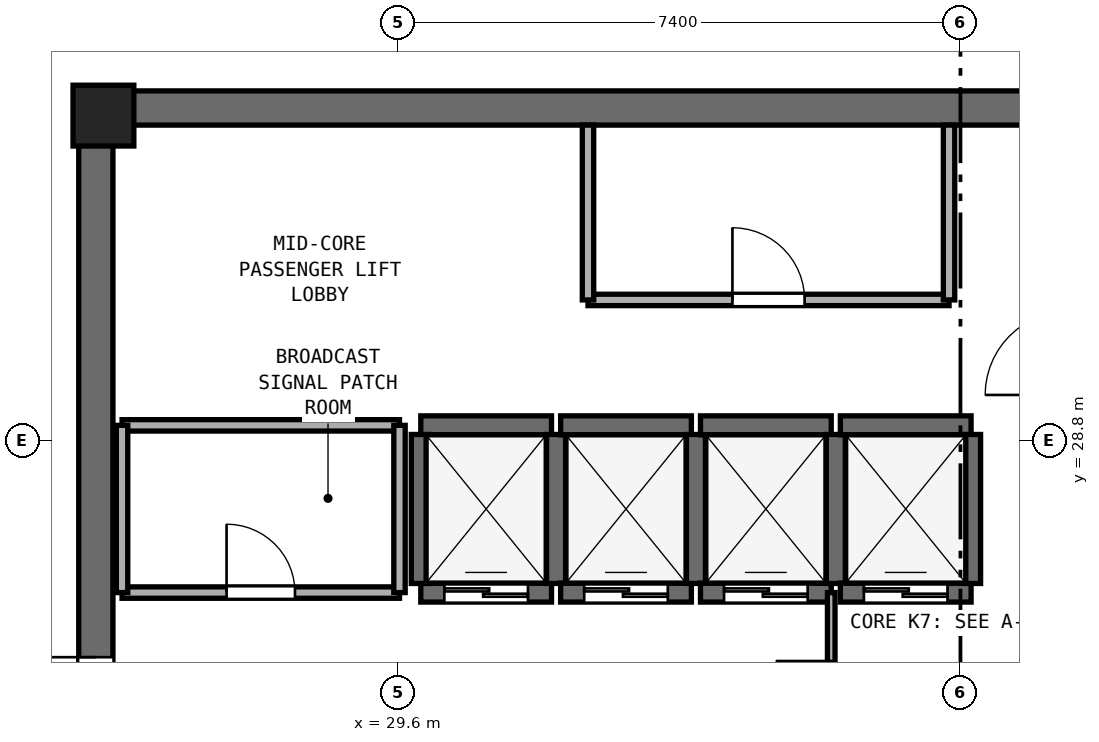
"""IFC4 building model, lengths in metres.
Left out: names, types, materials, properties, quantities, classifications, styles, units other than length and angle.
Written with IfcOpenShell. Run it as: python <this file> out.ifc"""

import sys

from ifc_helpers import new_model, si_unit, direction, frame, frame_2d, origin, origin_2d, place, context, subcontext, project, spatial, rectangle, extrude, element, fill, save


model = new_model("IFC4")
c1 = context("Model", 3, precision=1e-05, world=origin(), true_north=direction((0.0, 1.0)))
c2 = subcontext(c1, "Body", "Model", "MODEL_VIEW")
j1 = project(units=[si_unit("LENGTHUNIT", "METRE"), si_unit("PLANEANGLEUNIT", "RADIAN")], contexts=[c1])
p1 = place(None, origin())
s1 = spatial("IfcSite", under=j1, at=p1, CompositionType="ELEMENT")
p2 = place(p1, origin())
s2 = spatial("IfcBuilding", under=s1, at=p2, CompositionType="ELEMENT")
p3 = place(p2, frame((0.0, 0.0, 255.4)))
s3 = spatial("IfcBuildingStorey", under=s2, at=p3, CompositionType="ELEMENT", Elevation=255.4)
p4 = place(p3, frame((25.4, 33.175, 0.0), z_axis=(0.0, 0.0, 1.0), x_axis=(1.0, 0.0, 0.0)))
e1 = element("IfcWall", 1, at=p4, inside=s3, PredefinedType="SHEAR", context=c2, shape_type="SweptSolid", body=[
    extrude(rectangle(XDim=23.2, YDim=0.45, at=frame_2d((11.6, 0.0))), origin(), (0.0, 0.0, 1.0), 3.51),
])
p5 = place(p3, frame((25.625, 17.45, 0.0), z_axis=(0.0, 0.0, 1.0), x_axis=(0.0, 1.0, 0.0)))
e2 = element("IfcWall", 2, at=p5, inside=s3, PredefinedType="SHEAR", context=c2, shape_type="SweptSolid", body=[
    extrude(rectangle(XDim=15.5, YDim=0.45, at=frame_2d((7.75, 0.0))), origin(), (0.0, 0.0, 1.0), 3.51),
])
p6 = place(p5, frame((7.0, 0.0, 0.0)))
e3 = element("IfcOpeningElement", 3, at=p6, cuts=e2, PredefinedType="OPENING", context=c2, shape_type="SweptSolid", body=[
    extrude(rectangle(XDim=1.5, YDim=2.15, at=frame_2d((0.75, 1.075))), frame((0.0, 0.235, 0.0), z_axis=(0.0, -1.0, 0.0), x_axis=(1.0, 0.0, 0.0)), (0.0, 0.0, 1.0), 0.47),
])
p7 = place(p3, frame((25.725, 33.075, 0.0), z_axis=(0.0, 0.0, 1.0), x_axis=(1.0, 0.0, 0.0)))
e4 = element("IfcColumn", 4, at=p7, inside=s3, PredefinedType="PILASTER", context=c2, shape_type="SweptSolid", body=[
    extrude(rectangle(XDim=0.8, YDim=0.8, at=origin_2d()), origin(), (0.0, 0.0, 1.0), 3.8),
])
p8 = place(p3, frame((29.9, 26.8, 0.0), z_axis=(0.0, 0.0, 1.0), x_axis=(1.0, 0.0, 0.0)))
e5 = element("IfcWall", 5, at=p8, inside=s3, PredefinedType="SHEAR", context=c2, shape_type="SweptSolid", body=[
    extrude(rectangle(XDim=1.72, YDim=0.25, at=frame_2d((0.86, 0.0))), origin(), (0.0, 0.0, 1.0), 3.51),
])
p9 = place(p8, frame((0.31, 0.0, 0.0)))
e6 = element("IfcOpeningElement", 6, at=p9, cuts=e5, PredefinedType="OPENING", context=c2, shape_type="SweptSolid", body=[
    extrude(rectangle(XDim=1.1, YDim=2.15, at=frame_2d((0.55, 1.075))), frame((0.0, 0.135, 0.0), z_axis=(0.0, -1.0, 0.0), x_axis=(1.0, 0.0, 0.0)), (0.0, 0.0, 1.0), 0.27),
])
p10 = place(p3, frame((29.9, 29.0, 0.0), z_axis=(0.0, 0.0, 1.0), x_axis=(1.0, 0.0, 0.0)))
e7 = element("IfcWall", 7, at=p10, inside=s3, PredefinedType="SHEAR", context=c2, shape_type="SweptSolid", body=[
    extrude(rectangle(XDim=1.72, YDim=0.25, at=frame_2d((0.86, 0.0))), origin(), (0.0, 0.0, 1.0), 3.51),
])
for number, where, z_axis, x_axis in (
    (8, (29.9, 26.92, 0.0), (0.0, 0.0, 1.0), (0.0, 1.0, 0.0)),
    (9, (31.68, 26.92, 0.0), (0.0, 0.0, 1.0), (0.0, 1.0, 0.0)),
):
    element("IfcWall", number, at=place(p3, frame(where, z_axis=z_axis, x_axis=x_axis)), inside=s3, PredefinedType="SHEAR", context=c2, shape_type="SweptSolid", body=[
        extrude(rectangle(XDim=1.96, YDim=0.25, at=frame_2d((0.98, 0.0))), origin(), (0.0, 0.0, 1.0), 3.51),
    ])
p11 = place(p3, frame((31.74, 26.8, 0.0), z_axis=(0.0, 0.0, 1.0), x_axis=(1.0, 0.0, 0.0)))
e10 = element("IfcWall", 10, at=p11, inside=s3, PredefinedType="SHEAR", context=c2, shape_type="SweptSolid", body=[
    extrude(rectangle(XDim=1.72, YDim=0.25, at=frame_2d((0.86, 0.0))), origin(), (0.0, 0.0, 1.0), 3.51),
])
p12 = place(p11, frame((0.31, 0.0, 0.0)))
e11 = element("IfcOpeningElement", 11, at=p12, cuts=e10, PredefinedType="OPENING", context=c2, shape_type="SweptSolid", body=[
    extrude(rectangle(XDim=1.1, YDim=2.15, at=frame_2d((0.55, 1.075))), frame((0.0, 0.135, 0.0), z_axis=(0.0, -1.0, 0.0), x_axis=(1.0, 0.0, 0.0)), (0.0, 0.0, 1.0), 0.27),
])
p13 = place(p3, frame((31.74, 29.0, 0.0), z_axis=(0.0, 0.0, 1.0), x_axis=(1.0, 0.0, 0.0)))
e12 = element("IfcWall", 12, at=p13, inside=s3, PredefinedType="SHEAR", context=c2, shape_type="SweptSolid", body=[
    extrude(rectangle(XDim=1.72, YDim=0.25, at=frame_2d((0.86, 0.0))), origin(), (0.0, 0.0, 1.0), 3.51),
])
p14 = place(p3, frame((33.52, 26.92, 0.0), z_axis=(0.0, 0.0, 1.0), x_axis=(0.0, 1.0, 0.0)))
e13 = element("IfcWall", 13, at=p14, inside=s3, PredefinedType="SHEAR", context=c2, shape_type="SweptSolid", body=[
    extrude(rectangle(XDim=1.96, YDim=0.25, at=frame_2d((0.98, 0.0))), origin(), (0.0, 0.0, 1.0), 3.51),
])
p15 = place(p3, frame((33.58, 26.8, 0.0), z_axis=(0.0, 0.0, 1.0), x_axis=(1.0, 0.0, 0.0)))
e14 = element("IfcWall", 14, at=p15, inside=s3, PredefinedType="SHEAR", context=c2, shape_type="SweptSolid", body=[
    extrude(rectangle(XDim=1.72, YDim=0.25, at=frame_2d((0.86, 0.0))), origin(), (0.0, 0.0, 1.0), 3.51),
])
p16 = place(p15, frame((0.31, 0.0, 0.0)))
e15 = element("IfcOpeningElement", 15, at=p16, cuts=e14, PredefinedType="OPENING", context=c2, shape_type="SweptSolid", body=[
    extrude(rectangle(XDim=1.1, YDim=2.15, at=frame_2d((0.55, 1.075))), frame((0.0, 0.135, 0.0), z_axis=(0.0, -1.0, 0.0), x_axis=(1.0, 0.0, 0.0)), (0.0, 0.0, 1.0), 0.27),
])
p17 = place(p3, frame((33.58, 29.0, 0.0), z_axis=(0.0, 0.0, 1.0), x_axis=(1.0, 0.0, 0.0)))
e16 = element("IfcWall", 16, at=p17, inside=s3, PredefinedType="SHEAR", context=c2, shape_type="SweptSolid", body=[
    extrude(rectangle(XDim=1.72, YDim=0.25, at=frame_2d((0.86, 0.0))), origin(), (0.0, 0.0, 1.0), 3.51),
])
p18 = place(p3, frame((35.36, 26.92, 0.0), z_axis=(0.0, 0.0, 1.0), x_axis=(0.0, 1.0, 0.0)))
e17 = element("IfcWall", 17, at=p18, inside=s3, PredefinedType="SHEAR", context=c2, shape_type="SweptSolid", body=[
    extrude(rectangle(XDim=1.96, YDim=0.25, at=frame_2d((0.98, 0.0))), origin(), (0.0, 0.0, 1.0), 3.51),
])
p19 = place(p3, frame((35.42, 26.8, 0.0), z_axis=(0.0, 0.0, 1.0), x_axis=(1.0, 0.0, 0.0)))
e18 = element("IfcWall", 18, at=p19, inside=s3, PredefinedType="SHEAR", context=c2, shape_type="SweptSolid", body=[
    extrude(rectangle(XDim=1.72, YDim=0.25, at=frame_2d((0.86, 0.0))), origin(), (0.0, 0.0, 1.0), 3.51),
])
p20 = place(p19, frame((0.31, 0.0, 0.0)))
e19 = element("IfcOpeningElement", 19, at=p20, cuts=e18, PredefinedType="OPENING", context=c2, shape_type="SweptSolid", body=[
    extrude(rectangle(XDim=1.1, YDim=2.15, at=frame_2d((0.55, 1.075))), frame((0.0, 0.135, 0.0), z_axis=(0.0, -1.0, 0.0), x_axis=(1.0, 0.0, 0.0)), (0.0, 0.0, 1.0), 0.27),
])
p21 = place(p3, frame((35.42, 29.0, 0.0), z_axis=(0.0, 0.0, 1.0), x_axis=(1.0, 0.0, 0.0)))
e20 = element("IfcWall", 20, at=p21, inside=s3, PredefinedType="SHEAR", context=c2, shape_type="SweptSolid", body=[
    extrude(rectangle(XDim=1.72, YDim=0.25, at=frame_2d((0.86, 0.0))), origin(), (0.0, 0.0, 1.0), 3.51),
])
p22 = place(p3, frame((37.14, 26.92, 0.0), z_axis=(0.0, 0.0, 1.0), x_axis=(0.0, 1.0, 0.0)))
e21 = element("IfcWall", 21, at=p22, inside=s3, PredefinedType="SHEAR", context=c2, shape_type="SweptSolid", body=[
    extrude(rectangle(XDim=1.96, YDim=0.25, at=frame_2d((0.98, 0.0))), origin(), (0.0, 0.0, 1.0), 3.51),
])
p23 = place(p3, frame((32.1, 30.65, 0.0), z_axis=(0.0, 0.0, 1.0), x_axis=(1.0, 0.0, 0.0)))
e22 = element("IfcWall", 22, at=p23, inside=s3, PredefinedType="PARTITIONING", context=c2, shape_type="SweptSolid", body=[
    extrude(rectangle(XDim=4.75, YDim=0.15, at=frame_2d((2.375, 0.0))), origin(), (0.0, 0.0, 1.0), 3.51),
])
p24 = place(p23, frame((1.9, 0.0, 0.0)))
e23 = element("IfcOpeningElement", 23, at=p24, cuts=e22, PredefinedType="OPENING", context=c2, shape_type="SweptSolid", body=[
    extrude(rectangle(XDim=0.95, YDim=2.1, at=frame_2d((0.475, 1.05))), frame((0.0, 0.085, 0.0), z_axis=(0.0, -1.0, 0.0), x_axis=(1.0, 0.0, 0.0)), (0.0, 0.0, 1.0), 0.17),
])
for number, where, z_axis, x_axis in (
    (24, (32.1, 30.65, 0.0), (0.0, 0.0, 1.0), (0.0, 1.0, 0.0)),
    (25, (36.85, 30.65, 0.0), (0.0, 0.0, 1.0), (0.0, 1.0, 0.0)),
):
    element("IfcWall", number, at=place(p3, frame(where, z_axis=z_axis, x_axis=x_axis)), inside=s3, PredefinedType="PARTITIONING", context=c2, shape_type="SweptSolid", body=[
        extrude(rectangle(XDim=2.3, YDim=0.15, at=frame_2d((1.15, 0.0))), origin(), (0.0, 0.0, 1.0), 3.51),
    ])
p25 = place(p3, frame((25.97, 26.8, 0.0), z_axis=(0.0, 0.0, 1.0), x_axis=(1.0, 0.0, 0.0)))
e26 = element("IfcWall", 26, at=p25, inside=s3, PredefinedType="PARTITIONING", context=c2, shape_type="SweptSolid", body=[
    extrude(rectangle(XDim=3.65, YDim=0.15, at=frame_2d((1.825, 0.0))), origin(), (0.0, 0.0, 1.0), 3.51),
])
p26 = place(p25, frame((1.375, 0.0, 0.0)))
e27 = element("IfcOpeningElement", 27, at=p26, cuts=e26, PredefinedType="OPENING", context=c2, shape_type="SweptSolid", body=[
    extrude(rectangle(XDim=0.9, YDim=2.1, at=frame_2d((0.45, 1.05))), frame((0.0, 0.085, 0.0), z_axis=(0.0, -1.0, 0.0), x_axis=(1.0, 0.0, 0.0)), (0.0, 0.0, 1.0), 0.17),
])
p27 = place(p3, frame((25.97, 29.0, 0.0), z_axis=(0.0, 0.0, 1.0), x_axis=(1.0, 0.0, 0.0)))
e28 = element("IfcWall", 28, at=p27, inside=s3, PredefinedType="PARTITIONING", context=c2, shape_type="SweptSolid", body=[
    extrude(rectangle(XDim=3.65, YDim=0.15, at=frame_2d((1.825, 0.0))), origin(), (0.0, 0.0, 1.0), 3.51),
])
p28 = place(p3, frame((25.97, 26.8, 0.0), z_axis=(0.0, 0.0, 1.0), x_axis=(0.0, 1.0, 0.0)))
e29 = element("IfcWall", 29, at=p28, inside=s3, PredefinedType="PARTITIONING", context=c2, shape_type="SweptSolid", body=[
    extrude(rectangle(XDim=2.2, YDim=0.15, at=frame_2d((1.1, 0.0))), origin(), (0.0, 0.0, 1.0), 2.61),
])
p29 = place(p3, frame((29.62, 26.8, 0.0), z_axis=(0.0, 0.0, 1.0), x_axis=(0.0, 1.0, 0.0)))
e30 = element("IfcWall", 30, at=p29, inside=s3, PredefinedType="PARTITIONING", context=c2, shape_type="SweptSolid", body=[
    extrude(rectangle(XDim=2.2, YDim=0.15, at=frame_2d((1.1, 0.0))), origin(), (0.0, 0.0, 1.0), 3.51),
])
p30 = place(p3, frame((35.3, 23.6, 0.0), z_axis=(0.0, 0.0, 1.0), x_axis=(0.0, 1.0, 0.0)))
e31 = element("IfcWall", 31, at=p30, inside=s3, PredefinedType="PARTITIONING", context=c2, shape_type="SweptSolid", body=[
    extrude(rectangle(XDim=3.2, YDim=0.1, at=frame_2d((1.6, 0.0))), origin(), (0.0, 0.0, 1.0), 3.51),
])
p31 = place(p30, frame((0.85, 0.0, 0.0)))
e32 = element("IfcOpeningElement", 32, at=p31, cuts=e31, PredefinedType="OPENING", context=c2, shape_type="SweptSolid", body=[
    extrude(rectangle(XDim=1.45, YDim=2.12, at=frame_2d((0.725, 1.06))), frame((0.0, 0.06, 0.0), z_axis=(0.0, -1.0, 0.0), x_axis=(1.0, 0.0, 0.0)), (0.0, 0.0, 1.0), 0.12),
])
p32 = place(p9, origin())
e33 = element("IfcDoor", 33, at=p32, inside=s3, OperationType="DOUBLE_DOOR_SLIDING", PredefinedType="DOOR", context=c2, shape_type="SweptSolid", body=[
    extrude(rectangle(XDim=1.1, YDim=2.15, at=frame_2d((0.55, 1.075))), frame((0.0, 0.025, 0.0), z_axis=(0.0, -1.0, 0.0), x_axis=(1.0, 0.0, 0.0)), (0.0, 0.0, 1.0), 0.05),
])
fill(e6, e33)
p33 = place(p12, origin())
e34 = element("IfcDoor", 34, at=p33, inside=s3, OperationType="DOUBLE_DOOR_SLIDING", PredefinedType="DOOR", context=c2, shape_type="SweptSolid", body=[
    extrude(rectangle(XDim=1.1, YDim=2.15, at=frame_2d((0.55, 1.075))), frame((0.0, 0.025, 0.0), z_axis=(0.0, -1.0, 0.0), x_axis=(1.0, 0.0, 0.0)), (0.0, 0.0, 1.0), 0.05),
])
fill(e11, e34)
p34 = place(p16, origin())
e35 = element("IfcDoor", 35, at=p34, inside=s3, OperationType="DOUBLE_DOOR_SLIDING", PredefinedType="DOOR", context=c2, shape_type="SweptSolid", body=[
    extrude(rectangle(XDim=1.1, YDim=2.15, at=frame_2d((0.55, 1.075))), frame((0.0, 0.025, 0.0), z_axis=(0.0, -1.0, 0.0), x_axis=(1.0, 0.0, 0.0)), (0.0, 0.0, 1.0), 0.05),
])
fill(e15, e35)
p35 = place(p20, origin())
e36 = element("IfcDoor", 36, at=p35, inside=s3, OperationType="DOUBLE_DOOR_SLIDING", PredefinedType="DOOR", context=c2, shape_type="SweptSolid", body=[
    extrude(rectangle(XDim=1.1, YDim=2.15, at=frame_2d((0.55, 1.075))), frame((0.0, 0.025, 0.0), z_axis=(0.0, -1.0, 0.0), x_axis=(1.0, 0.0, 0.0)), (0.0, 0.0, 1.0), 0.05),
])
fill(e19, e36)
p36 = place(p6, origin())
e37 = element("IfcDoor", 37, at=p36, inside=s3, OperationType="DOUBLE_DOOR_SINGLE_SWING", PredefinedType="DOOR", context=c2, shape_type="SweptSolid", body=[
    extrude(rectangle(XDim=1.5, YDim=2.15, at=frame_2d((0.75, 1.075))), frame((0.0, 0.025, 0.0), z_axis=(0.0, -1.0, 0.0), x_axis=(1.0, 0.0, 0.0)), (0.0, 0.0, 1.0), 0.05),
])
fill(e3, e37)
p37 = place(p24, origin())
e38 = element("IfcDoor", 38, at=p37, inside=s3, OperationType="SINGLE_SWING_LEFT", PredefinedType="DOOR", context=c2, shape_type="SweptSolid", body=[
    extrude(rectangle(XDim=0.95, YDim=2.1, at=frame_2d((0.475, 1.05))), frame((0.0, 0.025, 0.0), z_axis=(0.0, -1.0, 0.0), x_axis=(1.0, 0.0, 0.0)), (0.0, 0.0, 1.0), 0.05),
])
fill(e23, e38)
p38 = place(p26, origin())
e39 = element("IfcDoor", 39, at=p38, inside=s3, OperationType="SINGLE_SWING_LEFT", PredefinedType="DOOR", context=c2, shape_type="SweptSolid", body=[
    extrude(rectangle(XDim=0.9, YDim=2.1, at=frame_2d((0.45, 1.05))), frame((0.0, 0.025, 0.0), z_axis=(0.0, -1.0, 0.0), x_axis=(1.0, 0.0, 0.0)), (0.0, 0.0, 1.0), 0.05),
])
fill(e27, e39)
p39 = place(p31, origin())
e40 = element("IfcDoor", 40, at=p39, inside=s3, OperationType="DOUBLE_DOOR_SINGLE_SWING", PredefinedType="DOOR", context=c2, shape_type="SweptSolid", body=[
    extrude(rectangle(XDim=1.45, YDim=2.12, at=frame_2d((0.725, 1.06))), frame((0.0, 0.025, 0.0), z_axis=(0.0, -1.0, 0.0), x_axis=(1.0, 0.0, 0.0)), (0.0, 0.0, 1.0), 0.05),
])
fill(e32, e40)
save(model, sys.argv[1])
